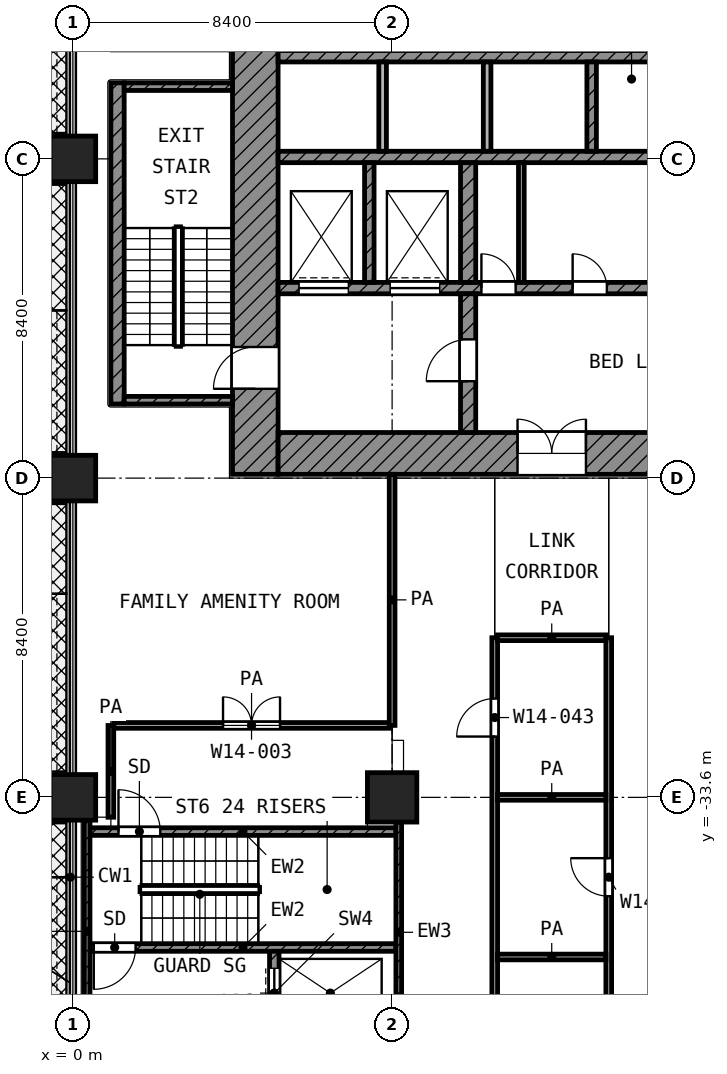
"""IFC4 building model, lengths in metres.
Left out: names, types, materials, properties, quantities, classifications, styles, units other than length and angle.
Written with IfcOpenShell. Run it as: python <this file> out.ifc"""

import sys

from ifc_helpers import new_model, si_unit, direction, frame, frame_2d, origin, origin_2d, place, context, subcontext, project, spatial, rectangle, extrude, element, fill, save


model = new_model("IFC4")
c1 = context("Model", 3, precision=1e-05, world=origin(), true_north=direction((0.0, 1.0)))
c2 = subcontext(c1, "Body", "Model", "MODEL_VIEW")
j1 = project(units=[si_unit("LENGTHUNIT", "METRE"), si_unit("PLANEANGLEUNIT", "RADIAN")], contexts=[c1])
p1 = place(None, origin())
s1 = spatial("IfcSite", under=j1, at=p1, CompositionType="ELEMENT")
p2 = place(p1, origin())
s2 = spatial("IfcBuilding", under=s1, at=p2, CompositionType="ELEMENT")
p3 = place(p2, frame((0.0, 0.0, 64.4)))
s3 = spatial("IfcBuildingStorey", under=s2, at=p3, CompositionType="ELEMENT", Elevation=64.4)
for number, where, z_axis, x_axis in (
    (1, (0.0, -16.8, 0.0), (0.0, 0.0, 1.0), (1.0, 0.0, 0.0)),
    (2, (0.0, -25.2, 0.0), (0.0, 0.0, 1.0), (1.0, 0.0, 0.0)),
    (3, (0.0, -33.6, 0.0), (0.0, 0.0, 1.0), (1.0, 0.0, 0.0)),
):
    element("IfcColumn", number, at=place(p3, frame(where, z_axis=z_axis, x_axis=x_axis)), inside=s3, PredefinedType="COLUMN", context=c2, shape_type="SweptSolid", body=[
        extrude(rectangle(XDim=1.2, YDim=1.2, at=origin_2d()), origin(), (0.0, 0.0, 1.0), 4.2),
    ])
p4 = place(p3, frame((8.4, -33.6, 0.0), z_axis=(0.0, 0.0, 1.0), x_axis=(1.0, 0.0, 0.0)))
e4 = element("IfcColumn", 4, at=p4, inside=s3, PredefinedType="COLUMN", context=c2, shape_type="SweptSolid", body=[
    extrude(rectangle(XDim=1.3, YDim=1.3, at=origin_2d()), origin(), (0.0, 0.0, 1.0), 4.2),
])
p5 = place(p3, frame((4.8, -25.1, 0.0), z_axis=(0.0, 0.0, 1.0), x_axis=(0.0, 1.0, 0.0)))
e5 = element("IfcWall", 5, at=p5, inside=s3, PredefinedType="SHEAR", context=c2, shape_type="SweptSolid", body=[
    extrude(rectangle(XDim=19.7, YDim=1.2, at=frame_2d((9.85, 0.0))), origin(), (0.0, 0.0, 1.0), 3.9),
])
p6 = place(p5, frame((11.55, 0.0, 0.0)))
e6 = element("IfcOpeningElement", 6, at=p6, cuts=e5, PredefinedType="OPENING", context=c2, shape_type="SweptSolid", body=[
    extrude(rectangle(XDim=1.1, YDim=2.1, at=frame_2d((0.55, 1.05))), frame((0.0, 0.61, 0.0), z_axis=(0.0, -1.0, 0.0), x_axis=(1.0, 0.0, 0.0)), (0.0, 0.0, 1.0), 1.22),
])
p7 = place(p5, frame((2.25, 0.0, 0.0)))
e7 = element("IfcOpeningElement", 7, at=p7, cuts=e5, PredefinedType="OPENING", context=c2, shape_type="SweptSolid", body=[
    extrude(rectangle(XDim=1.1, YDim=2.1, at=frame_2d((0.55, 1.05))), frame((0.0, 0.61, 0.0), z_axis=(0.0, -1.0, 0.0), x_axis=(1.0, 0.0, 0.0)), (0.0, 0.0, 1.0), 1.22),
])
p8 = place(p3, frame((5.4, -24.55, 0.0), z_axis=(0.0, 0.0, 1.0), x_axis=(1.0, 0.0, 0.0)))
e8 = element("IfcWall", 8, at=p8, inside=s3, PredefinedType="SHEAR", context=c2, shape_type="SweptSolid", body=[
    extrude(rectangle(XDim=18.6, YDim=1.1, at=frame_2d((9.3, 0.0))), origin(), (0.0, 0.0, 1.0), 3.9),
])
p9 = place(p8, frame((6.3, 0.0, 0.0)))
e9 = element("IfcOpeningElement", 9, at=p9, cuts=e8, PredefinedType="OPENING", context=c2, shape_type="SweptSolid", body=[
    extrude(rectangle(XDim=1.8, YDim=2.1, at=frame_2d((0.9, 1.05))), frame((0.0, 0.56, 0.0), z_axis=(0.0, -1.0, 0.0), x_axis=(1.0, 0.0, 0.0)), (0.0, 0.0, 1.0), 1.12),
])
for number, where, z_axis, x_axis in (
    (10, (5.4, -14.1, 0.0), (0.0, 0.0, 1.0), (1.0, 0.0, 0.0)),
    (11, (5.4, -16.75, 0.0), (0.0, 0.0, 1.0), (1.0, 0.0, 0.0)),
):
    element("IfcWall", number, at=place(p3, frame(where, z_axis=z_axis, x_axis=x_axis)), inside=s3, PredefinedType="SHEAR", context=c2, shape_type="SweptSolid", body=[
        extrude(rectangle(XDim=16.65, YDim=0.3, at=frame_2d((8.325, 0.0))), origin(), (0.0, 0.0, 1.0), 3.9),
    ])
p10 = place(p3, frame((5.4, -20.2, 0.0), z_axis=(0.0, 0.0, 1.0), x_axis=(1.0, 0.0, 0.0)))
e12 = element("IfcWall", 12, at=p10, inside=s3, PredefinedType="SHEAR", context=c2, shape_type="SweptSolid", body=[
    extrude(rectangle(XDim=14.65, YDim=0.3, at=frame_2d((7.325, 0.0))), origin(), (0.0, 0.0, 1.0), 3.9),
])
p11 = place(p10, frame((10.55, 0.0, 0.0)))
e13 = element("IfcOpeningElement", 13, at=p11, cuts=e12, PredefinedType="OPENING", context=c2, shape_type="SweptSolid", body=[
    extrude(rectangle(XDim=1.3, YDim=2.1, at=frame_2d((0.65, 1.05))), frame((0.0, 0.16, 0.0), z_axis=(0.0, -1.0, 0.0), x_axis=(1.0, 0.0, 0.0)), (0.0, 0.0, 1.0), 0.32),
])
p12 = place(p10, frame((12.95, 0.0, 0.0)))
e14 = element("IfcOpeningElement", 14, at=p12, cuts=e12, PredefinedType="OPENING", context=c2, shape_type="SweptSolid", body=[
    extrude(rectangle(XDim=1.3, YDim=2.1, at=frame_2d((0.65, 1.05))), frame((0.0, 0.16, 0.0), z_axis=(0.0, -1.0, 0.0), x_axis=(1.0, 0.0, 0.0)), (0.0, 0.0, 1.0), 0.32),
])
p13 = place(p10, frame((0.55, 0.0, 0.0)))
e15 = element("IfcOpeningElement", 15, at=p13, cuts=e12, PredefinedType="OPENING", context=c2, shape_type="SweptSolid", body=[
    extrude(rectangle(XDim=1.3, YDim=2.1, at=frame_2d((0.65, 1.05))), frame((0.0, 0.16, 0.0), z_axis=(0.0, -1.0, 0.0), x_axis=(1.0, 0.0, 0.0)), (0.0, 0.0, 1.0), 0.32),
])
p14 = place(p10, frame((2.95, 0.0, 0.0)))
e16 = element("IfcOpeningElement", 16, at=p14, cuts=e12, PredefinedType="OPENING", context=c2, shape_type="SweptSolid", body=[
    extrude(rectangle(XDim=1.3, YDim=2.1, at=frame_2d((0.65, 1.05))), frame((0.0, 0.16, 0.0), z_axis=(0.0, -1.0, 0.0), x_axis=(1.0, 0.0, 0.0)), (0.0, 0.0, 1.0), 0.32),
])
p15 = place(p10, frame((5.35, 0.0, 0.0)))
e17 = element("IfcOpeningElement", 17, at=p15, cuts=e12, PredefinedType="OPENING", context=c2, shape_type="SweptSolid", body=[
    extrude(rectangle(XDim=0.9, YDim=2.1, at=frame_2d((0.45, 1.05))), frame((0.0, 0.16, 0.0), z_axis=(0.0, -1.0, 0.0), x_axis=(1.0, 0.0, 0.0)), (0.0, 0.0, 1.0), 0.32),
])
p16 = place(p10, frame((7.75, 0.0, 0.0)))
e18 = element("IfcOpeningElement", 18, at=p16, cuts=e12, PredefinedType="OPENING", context=c2, shape_type="SweptSolid", body=[
    extrude(rectangle(XDim=0.9, YDim=2.1, at=frame_2d((0.45, 1.05))), frame((0.0, 0.16, 0.0), z_axis=(0.0, -1.0, 0.0), x_axis=(1.0, 0.0, 0.0)), (0.0, 0.0, 1.0), 0.32),
])
p17 = place(p3, frame((10.4, -24.0, 0.0), z_axis=(0.0, 0.0, 1.0), x_axis=(0.0, 1.0, 0.0)))
e19 = element("IfcWall", 19, at=p17, inside=s3, PredefinedType="SHEAR", context=c2, shape_type="SweptSolid", body=[
    extrude(rectangle(XDim=3.65, YDim=0.4, at=frame_2d((1.825, 0.0))), origin(), (0.0, 0.0, 1.0), 3.9),
])
p18 = place(p17, frame((1.35, 0.0, 0.0)))
e20 = element("IfcOpeningElement", 20, at=p18, cuts=e19, PredefinedType="OPENING", context=c2, shape_type="SweptSolid", body=[
    extrude(rectangle(XDim=1.1, YDim=2.1, at=frame_2d((0.55, 1.05))), frame((0.0, 0.21, 0.0), z_axis=(0.0, -1.0, 0.0), x_axis=(1.0, 0.0, 0.0)), (0.0, 0.0, 1.0), 0.42),
])
p19 = place(p3, frame((10.4, -20.05, 0.0), z_axis=(0.0, 0.0, 1.0), x_axis=(0.0, 1.0, 0.0)))
e21 = element("IfcWall", 21, at=p19, inside=s3, PredefinedType="SHEAR", context=c2, shape_type="SweptSolid", body=[
    extrude(rectangle(XDim=3.15, YDim=0.4, at=frame_2d((1.575, 0.0))), origin(), (0.0, 0.0, 1.0), 3.9),
])
p20 = place(p3, frame((7.8, -20.05, 0.0), z_axis=(0.0, 0.0, 1.0), x_axis=(0.0, 1.0, 0.0)))
e22 = element("IfcWall", 22, at=p20, inside=s3, PredefinedType="SHEAR", context=c2, shape_type="SweptSolid", body=[
    extrude(rectangle(XDim=3.15, YDim=0.25, at=frame_2d((1.575, 0.0))), origin(), (0.0, 0.0, 1.0), 3.9),
])
for number, where, z_axis, x_axis in (
    (23, (8.15, -16.6, 0.0), (0.0, 0.0, 1.0), (0.0, 1.0, 0.0)),
    (24, (10.9, -16.6, 0.0), (0.0, 0.0, 1.0), (0.0, 1.0, 0.0)),
):
    element("IfcWall", number, at=place(p3, frame(where, z_axis=z_axis, x_axis=x_axis)), inside=s3, PredefinedType="PARTITIONING", context=c2, shape_type="SweptSolid", body=[
        extrude(rectangle(XDim=2.35, YDim=0.2, at=frame_2d((1.175, 0.0))), origin(), (0.0, 0.0, 1.0), 3.9),
    ])
p21 = place(p3, frame((13.65, -16.6, 0.0), z_axis=(0.0, 0.0, 1.0), x_axis=(0.0, 1.0, 0.0)))
e25 = element("IfcWall", 25, at=p21, inside=s3, PredefinedType="SHEAR", context=c2, shape_type="SweptSolid", body=[
    extrude(rectangle(XDim=2.35, YDim=0.25, at=frame_2d((1.175, 0.0))), origin(), (0.0, 0.0, 1.0), 3.9),
])
p22 = place(p3, frame((11.8, -20.05, 0.0), z_axis=(0.0, 0.0, 1.0), x_axis=(0.0, 1.0, 0.0)))
e26 = element("IfcWall", 26, at=p22, inside=s3, PredefinedType="PARTITIONING", context=c2, shape_type="SweptSolid", body=[
    extrude(rectangle(XDim=3.15, YDim=0.15, at=frame_2d((1.575, 0.0))), origin(), (0.0, 0.0, 1.0), 3.9),
])
p23 = place(p3, frame((1.175, -23.25, 0.0), z_axis=(0.0, 0.0, 1.0), x_axis=(0.0, 1.0, 0.0)))
e27 = element("IfcWall", 27, at=p23, inside=s3, PredefinedType="SHEAR", context=c2, shape_type="SweptSolid", body=[
    extrude(rectangle(XDim=8.45, YDim=0.35, at=frame_2d((4.225, 0.0))), origin(), (0.0, 0.0, 1.0), 3.9),
])
for number, where, z_axis, x_axis in (
    (28, (1.35, -14.9, 0.0), (0.0, 0.0, 1.0), (1.0, 0.0, 0.0)),
    (29, (1.35, -23.15, 0.0), (0.0, 0.0, 1.0), (1.0, 0.0, 0.0)),
):
    element("IfcWall", number, at=place(p3, frame(where, z_axis=z_axis, x_axis=x_axis)), inside=s3, PredefinedType="SHEAR", context=c2, shape_type="SweptSolid", body=[
        extrude(rectangle(XDim=2.85, YDim=0.2, at=frame_2d((1.425, 0.0))), origin(), (0.0, 0.0, 1.0), 3.9),
    ])
p24 = place(p3, frame((0.375, -40.05, 0.0), z_axis=(0.0, 0.0, 1.0), x_axis=(0.0, 1.0, 0.0)))
e30 = element("IfcWall", 30, at=p24, inside=s3, PredefinedType="SHEAR", context=c2, shape_type="SweptSolid", body=[
    extrude(rectangle(XDim=5.85, YDim=0.15, at=frame_2d((2.925, 0.0))), origin(), (0.0, 0.0, 1.0), 3.9),
])
p25 = place(p3, frame((8.575, -40.05, 0.0), z_axis=(0.0, 0.0, 1.0), x_axis=(0.0, 1.0, 0.0)))
e31 = element("IfcWall", 31, at=p25, inside=s3, PredefinedType="SHEAR", context=c2, shape_type="SweptSolid", body=[
    extrude(rectangle(XDim=5.8, YDim=0.15, at=frame_2d((2.9, 0.0))), origin(), (0.0, 0.0, 1.0), 3.9),
])
p26 = place(p3, frame((0.45, -34.5, 0.0), z_axis=(0.0, 0.0, 1.0), x_axis=(1.0, 0.0, 0.0)))
e32 = element("IfcWall", 32, at=p26, inside=s3, PredefinedType="SHEAR", context=c2, shape_type="SweptSolid", body=[
    extrude(rectangle(XDim=8.05, YDim=0.2, at=frame_2d((4.025, 0.0))), origin(), (0.0, 0.0, 1.0), 3.9),
])
p27 = place(p26, frame((0.75, 0.0, 0.0)))
e33 = element("IfcOpeningElement", 33, at=p27, cuts=e32, PredefinedType="OPENING", context=c2, shape_type="SweptSolid", body=[
    extrude(rectangle(XDim=1.1, YDim=2.1, at=frame_2d((0.55, 1.05))), frame((0.0, 0.11, 0.0), z_axis=(0.0, -1.0, 0.0), x_axis=(1.0, 0.0, 0.0)), (0.0, 0.0, 1.0), 0.22),
])
p28 = place(p3, frame((0.45, -37.55, 0.0), z_axis=(0.0, 0.0, 1.0), x_axis=(1.0, 0.0, 0.0)))
e34 = element("IfcWall", 34, at=p28, inside=s3, PredefinedType="SHEAR", context=c2, shape_type="SweptSolid", body=[
    extrude(rectangle(XDim=8.05, YDim=0.2, at=frame_2d((4.025, 0.0))), origin(), (0.0, 0.0, 1.0), 3.9),
])
p29 = place(p28, frame((0.1, 0.0, 0.0)))
e35 = element("IfcOpeningElement", 35, at=p29, cuts=e34, PredefinedType="OPENING", context=c2, shape_type="SweptSolid", body=[
    extrude(rectangle(XDim=1.1, YDim=2.1, at=frame_2d((0.55, 1.05))), frame((0.0, 0.11, 0.0), z_axis=(0.0, -1.0, 0.0), x_axis=(1.0, 0.0, 0.0)), (0.0, 0.0, 1.0), 0.22),
])
p30 = place(p3, frame((5.3, -39.85, 0.0), z_axis=(0.0, 0.0, 1.0), x_axis=(0.0, 1.0, 0.0)))
e36 = element("IfcWall", 36, at=p30, inside=s3, PredefinedType="SHEAR", context=c2, shape_type="SweptSolid", body=[
    extrude(rectangle(XDim=2.2, YDim=0.25, at=frame_2d((1.1, 0.0))), origin(), (0.0, 0.0, 1.0), 3.9),
])
p31 = place(p30, frame((0.45, 0.0, 0.0)))
e37 = element("IfcOpeningElement", 37, at=p31, cuts=e36, PredefinedType="OPENING", context=c2, shape_type="SweptSolid", body=[
    extrude(rectangle(XDim=1.3, YDim=2.1, at=frame_2d((0.65, 1.05))), frame((0.0, 0.135, 0.0), z_axis=(0.0, -1.0, 0.0), x_axis=(1.0, 0.0, 0.0)), (0.0, 0.0, 1.0), 0.27),
])
for number, where, z_axis, x_axis in (
    (38, (11.175, -37.8, 0.0), (0.0, 0.0, 1.0), (1.0, 0.0, 0.0)),
    (39, (11.175, -33.6, 0.0), (0.0, 0.0, 1.0), (1.0, 0.0, 0.0)),
):
    element("IfcWall", number, at=place(p3, frame(where, z_axis=z_axis, x_axis=x_axis)), inside=s3, PredefinedType="PARTITIONING", context=c2, shape_type="SweptSolid", body=[
        extrude(rectangle(XDim=2.85, YDim=0.15, at=frame_2d((1.425, 0.0))), origin(), (0.0, 0.0, 1.0), 3.9),
    ])
p32 = place(p3, frame((1.078, -31.707, 0.0), z_axis=(0.0, 0.0, 1.0), x_axis=(1.0, 0.0, 0.0)))
e40 = element("IfcWall", 40, at=p32, inside=s3, PredefinedType="PARTITIONING", context=c2, shape_type="SweptSolid", body=[
    extrude(rectangle(XDim=7.247, YDim=0.15, at=frame_2d((3.624, 0.0))), origin(), (0.0, 0.0, 1.0), 3.9),
])
p33 = place(p32, frame((2.873, 0.0, 0.0)))
e41 = element("IfcOpeningElement", 41, at=p33, cuts=e40, PredefinedType="OPENING", context=c2, shape_type="SweptSolid", body=[
    extrude(rectangle(XDim=1.5, YDim=2.1, at=frame_2d((0.75, 1.05))), frame((0.0, 0.085, 0.0), z_axis=(0.0, -1.0, 0.0), x_axis=(1.0, 0.0, 0.0)), (0.0, 0.0, 1.0), 0.17),
])
p34 = place(p3, frame((11.175, -29.4, 0.0), z_axis=(0.0, 0.0, 1.0), x_axis=(1.0, 0.0, 0.0)))
e42 = element("IfcWall", 42, at=p34, inside=s3, PredefinedType="PARTITIONING", context=c2, shape_type="SweptSolid", body=[
    extrude(rectangle(XDim=2.85, YDim=0.15, at=frame_2d((1.425, 0.0))), origin(), (0.0, 0.0, 1.0), 3.9),
])
p35 = place(p3, frame((1.0, -34.123, 0.0), z_axis=(0.0, 0.0, 1.0), x_axis=(0.0, 1.0, 0.0)))
e43 = element("IfcWall", 43, at=p35, inside=s3, PredefinedType="PARTITIONING", context=c2, shape_type="SweptSolid", body=[
    extrude(rectangle(XDim=2.414, YDim=0.15, at=frame_2d((1.207, 0.0))), origin(), (0.0, 0.0, 1.0), 3.9),
])
p36 = place(p3, frame((8.4, -31.707, 0.0), z_axis=(0.0, 0.0, 1.0), x_axis=(0.0, 1.0, 0.0)))
e44 = element("IfcWall", 44, at=p36, inside=s3, PredefinedType="PARTITIONING", context=c2, shape_type="SweptSolid", body=[
    extrude(rectangle(XDim=6.607, YDim=0.15, at=frame_2d((3.303, 0.0))), origin(), (0.0, 0.0, 1.0), 3.9),
])
p37 = place(p3, frame((11.1, -67.1, 0.0), z_axis=(0.0, 0.0, 1.0), x_axis=(0.0, 1.0, 0.0)))
e45 = element("IfcWall", 45, at=p37, inside=s3, PredefinedType="PARTITIONING", context=c2, shape_type="SweptSolid", body=[
    extrude(rectangle(XDim=37.7, YDim=0.15, at=frame_2d((18.85, 0.0))), origin(), (0.0, 0.0, 1.0), 3.9),
])
p38 = place(p37, frame((35.1, 0.0, 0.0)))
e46 = element("IfcOpeningElement", 46, at=p38, cuts=e45, PredefinedType="OPENING", context=c2, shape_type="SweptSolid", body=[
    extrude(rectangle(XDim=1.0, YDim=2.1, at=frame_2d((0.5, 1.05))), frame((0.0, 0.085, 0.0), z_axis=(0.0, -1.0, 0.0), x_axis=(1.0, 0.0, 0.0)), (0.0, 0.0, 1.0), 0.17),
])
p39 = place(p37, frame((22.4, 0.0, 0.0)))
e47 = element("IfcOpeningElement", 47, at=p39, cuts=e45, PredefinedType="OPENING", context=c2, shape_type="SweptSolid", body=[
    extrude(rectangle(XDim=1.2, YDim=2.1, at=frame_2d((0.6, 1.05))), frame((0.0, 0.085, 0.0), z_axis=(0.0, -1.0, 0.0), x_axis=(1.0, 0.0, 0.0)), (0.0, 0.0, 1.0), 0.17),
])
p40 = place(p37, frame((9.65, 0.0, 0.0)))
e48 = element("IfcOpeningElement", 48, at=p40, cuts=e45, PredefinedType="OPENING", context=c2, shape_type="SweptSolid", body=[
    extrude(rectangle(XDim=1.2, YDim=2.1, at=frame_2d((0.6, 1.05))), frame((0.0, 0.085, 0.0), z_axis=(0.0, -1.0, 0.0), x_axis=(1.0, 0.0, 0.0)), (0.0, 0.0, 1.0), 0.17),
])
p41 = place(p37, frame((1.35, 0.0, 0.0)))
e49 = element("IfcOpeningElement", 49, at=p41, cuts=e45, PredefinedType="OPENING", context=c2, shape_type="SweptSolid", body=[
    extrude(rectangle(XDim=1.0, YDim=2.1, at=frame_2d((0.5, 1.05))), frame((0.0, 0.085, 0.0), z_axis=(0.0, -1.0, 0.0), x_axis=(1.0, 0.0, 0.0)), (0.0, 0.0, 1.0), 0.17),
])
p42 = place(p3, frame((14.1, -67.1, 0.0), z_axis=(0.0, 0.0, 1.0), x_axis=(0.0, 1.0, 0.0)))
e50 = element("IfcWall", 50, at=p42, inside=s3, PredefinedType="PARTITIONING", context=c2, shape_type="SweptSolid", body=[
    extrude(rectangle(XDim=37.7, YDim=0.15, at=frame_2d((18.85, 0.0))), origin(), (0.0, 0.0, 1.0), 3.9),
])
p43 = place(p42, frame((30.9, 0.0, 0.0)))
e51 = element("IfcOpeningElement", 51, at=p43, cuts=e50, PredefinedType="OPENING", context=c2, shape_type="SweptSolid", body=[
    extrude(rectangle(XDim=1.0, YDim=2.1, at=frame_2d((0.5, 1.05))), frame((0.0, 0.085, 0.0), z_axis=(0.0, -1.0, 0.0), x_axis=(1.0, 0.0, 0.0)), (0.0, 0.0, 1.0), 0.17),
])
p44 = place(p13, origin())
e52 = element("IfcDoor", 52, at=p44, inside=s3, OperationType="DOUBLE_DOOR_SLIDING", PredefinedType="DOOR", context=c2, shape_type="SweptSolid", body=[
    extrude(rectangle(XDim=1.3, YDim=2.1, at=frame_2d((0.65, 1.05))), frame((0.0, 0.025, 0.0), z_axis=(0.0, -1.0, 0.0), x_axis=(1.0, 0.0, 0.0)), (0.0, 0.0, 1.0), 0.05),
])
fill(e15, e52)
p45 = place(p14, origin())
e53 = element("IfcDoor", 53, at=p45, inside=s3, OperationType="DOUBLE_DOOR_SLIDING", PredefinedType="DOOR", context=c2, shape_type="SweptSolid", body=[
    extrude(rectangle(XDim=1.3, YDim=2.1, at=frame_2d((0.65, 1.05))), frame((0.0, 0.025, 0.0), z_axis=(0.0, -1.0, 0.0), x_axis=(1.0, 0.0, 0.0)), (0.0, 0.0, 1.0), 0.05),
])
fill(e16, e53)
p46 = place(p7, origin())
e54 = element("IfcDoor", 54, at=p46, inside=s3, OperationType="SINGLE_SWING_LEFT", PredefinedType="DOOR", context=c2, shape_type="SweptSolid", body=[
    extrude(rectangle(XDim=1.1, YDim=2.1, at=frame_2d((0.55, 1.05))), frame((0.0, 0.025, 0.0), z_axis=(0.0, -1.0, 0.0), x_axis=(1.0, 0.0, 0.0)), (0.0, 0.0, 1.0), 0.05),
])
fill(e7, e54)
p47 = place(p18, origin())
e55 = element("IfcDoor", 55, at=p47, inside=s3, OperationType="SINGLE_SWING_LEFT", PredefinedType="DOOR", context=c2, shape_type="SweptSolid", body=[
    extrude(rectangle(XDim=1.1, YDim=2.1, at=frame_2d((0.55, 1.05))), frame((0.0, 0.025, 0.0), z_axis=(0.0, -1.0, 0.0), x_axis=(1.0, 0.0, 0.0)), (0.0, 0.0, 1.0), 0.05),
])
fill(e20, e55)
p48 = place(p9, origin())
e56 = element("IfcDoor", 56, at=p48, inside=s3, OperationType="DOUBLE_DOOR_SINGLE_SWING", PredefinedType="DOOR", context=c2, shape_type="SweptSolid", body=[
    extrude(rectangle(XDim=1.8, YDim=2.1, at=frame_2d((0.9, 1.05))), frame((0.0, 0.025, 0.0), z_axis=(0.0, -1.0, 0.0), x_axis=(1.0, 0.0, 0.0)), (0.0, 0.0, 1.0), 0.05),
])
fill(e9, e56)
p49 = place(p15, origin())
e57 = element("IfcDoor", 57, at=p49, inside=s3, OperationType="SINGLE_SWING_LEFT", PredefinedType="DOOR", context=c2, shape_type="SweptSolid", body=[
    extrude(rectangle(XDim=0.9, YDim=2.1, at=frame_2d((0.45, 1.05))), frame((0.0, 0.025, 0.0), z_axis=(0.0, -1.0, 0.0), x_axis=(1.0, 0.0, 0.0)), (0.0, 0.0, 1.0), 0.05),
])
fill(e17, e57)
p50 = place(p16, origin())
e58 = element("IfcDoor", 58, at=p50, inside=s3, OperationType="SINGLE_SWING_LEFT", PredefinedType="DOOR", context=c2, shape_type="SweptSolid", body=[
    extrude(rectangle(XDim=0.9, YDim=2.1, at=frame_2d((0.45, 1.05))), frame((0.0, 0.025, 0.0), z_axis=(0.0, -1.0, 0.0), x_axis=(1.0, 0.0, 0.0)), (0.0, 0.0, 1.0), 0.05),
])
fill(e18, e58)
p51 = place(p27, origin())
e59 = element("IfcDoor", 59, at=p51, inside=s3, OperationType="SINGLE_SWING_LEFT", PredefinedType="DOOR", context=c2, shape_type="SweptSolid", body=[
    extrude(rectangle(XDim=1.1, YDim=2.1, at=frame_2d((0.55, 1.05))), frame((0.0, 0.025, 0.0), z_axis=(0.0, -1.0, 0.0), x_axis=(1.0, 0.0, 0.0)), (0.0, 0.0, 1.0), 0.05),
])
fill(e33, e59)
p52 = place(p29, frame((1.1, 0.0, 0.0), z_axis=(0.0, 0.0, 1.0), x_axis=(-1.0, 0.0, 0.0)))
e60 = element("IfcDoor", 60, at=p52, inside=s3, OperationType="SINGLE_SWING_LEFT", PredefinedType="DOOR", context=c2, shape_type="SweptSolid", body=[
    extrude(rectangle(XDim=1.1, YDim=2.1, at=frame_2d((0.55, 1.05))), frame((0.0, 0.025, 0.0), z_axis=(0.0, -1.0, 0.0), x_axis=(1.0, 0.0, 0.0)), (0.0, 0.0, 1.0), 0.05),
])
fill(e35, e60)
p53 = place(p31, origin())
e61 = element("IfcDoor", 61, at=p53, inside=s3, OperationType="DOUBLE_DOOR_SLIDING", PredefinedType="DOOR", context=c2, shape_type="SweptSolid", body=[
    extrude(rectangle(XDim=1.3, YDim=2.1, at=frame_2d((0.65, 1.05))), frame((0.0, 0.025, 0.0), z_axis=(0.0, -1.0, 0.0), x_axis=(1.0, 0.0, 0.0)), (0.0, 0.0, 1.0), 0.05),
])
fill(e37, e61)
p54 = place(p33, origin())
e62 = element("IfcDoor", 62, at=p54, inside=s3, OperationType="DOUBLE_DOOR_SINGLE_SWING", PredefinedType="DOOR", context=c2, shape_type="SweptSolid", body=[
    extrude(rectangle(XDim=1.5, YDim=2.1, at=frame_2d((0.75, 1.05))), frame((0.0, 0.025, 0.0), z_axis=(0.0, -1.0, 0.0), x_axis=(1.0, 0.0, 0.0)), (0.0, 0.0, 1.0), 0.05),
])
fill(e41, e62)
p55 = place(p38, origin())
e63 = element("IfcDoor", 63, at=p55, inside=s3, OperationType="SINGLE_SWING_LEFT", PredefinedType="DOOR", context=c2, shape_type="SweptSolid", body=[
    extrude(rectangle(XDim=1.0, YDim=2.1, at=frame_2d((0.5, 1.05))), frame((0.0, 0.025, 0.0), z_axis=(0.0, -1.0, 0.0), x_axis=(1.0, 0.0, 0.0)), (0.0, 0.0, 1.0), 0.05),
])
fill(e46, e63)
p56 = place(p43, origin())
e64 = element("IfcDoor", 64, at=p56, inside=s3, OperationType="SINGLE_SWING_RIGHT", PredefinedType="DOOR", context=c2, shape_type="SweptSolid", body=[
    extrude(rectangle(XDim=1.0, YDim=2.1, at=frame_2d((0.5, 1.05))), frame((0.0, 0.025, 0.0), z_axis=(0.0, -1.0, 0.0), x_axis=(1.0, 0.0, 0.0)), (0.0, 0.0, 1.0), 0.05),
])
fill(e51, e64)
save(model, sys.argv[1])
